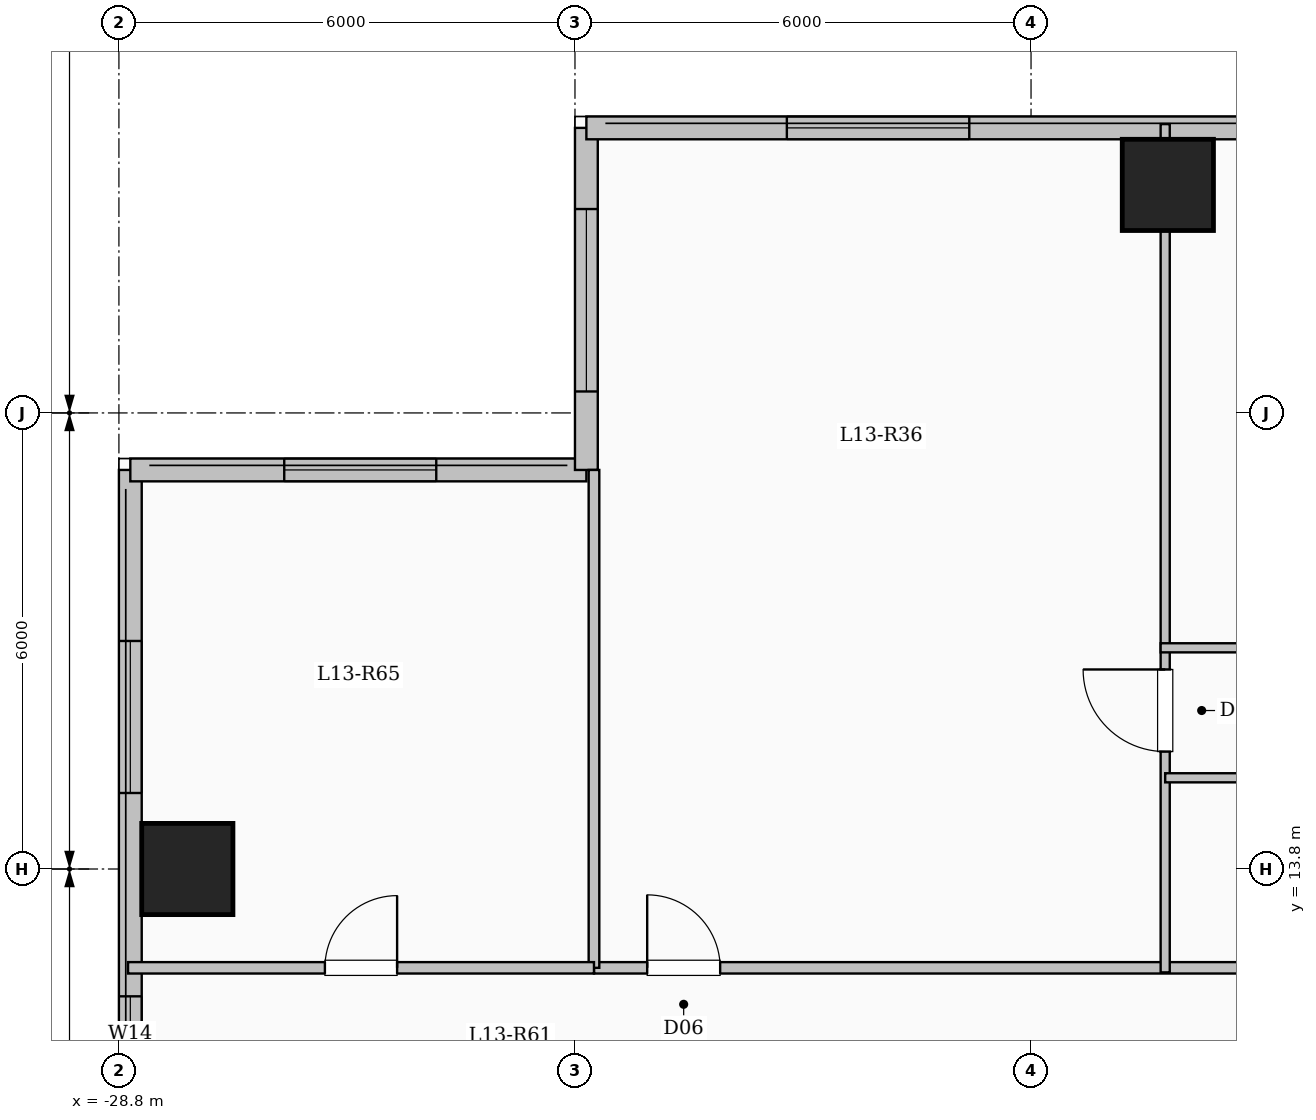
"""IFC4 building model, lengths in metres.
Left out: names, types, materials, properties, quantities, classifications, styles, units other than length and angle.
Written with IfcOpenShell. Run it as: python <this file> out.ifc"""

import sys

from ifc_helpers import new_model, si_unit, direction, frame, frame_2d, origin, origin_2d, place, context, subcontext, project, spatial, rectangle, extrude, element, fill, save


model = new_model("IFC4")
c1 = context("Model", 3, precision=1e-05, world=origin(), true_north=direction((0.0, 1.0)))
c2 = subcontext(c1, "Body", "Model", "MODEL_VIEW")
j1 = project(units=[si_unit("LENGTHUNIT", "METRE"), si_unit("PLANEANGLEUNIT", "RADIAN")], contexts=[c1])
p1 = place(None, origin())
s1 = spatial("IfcSite", under=j1, at=p1, CompositionType="ELEMENT")
p2 = place(p1, origin())
s2 = spatial("IfcBuilding", under=s1, at=p2, CompositionType="ELEMENT")
p3 = place(p2, frame((0.0, 0.0, 50.8)))
s3 = spatial("IfcBuildingStorey", under=s2, at=p3, CompositionType="ELEMENT", Elevation=50.8)
for number, where, z_axis, x_axis in (
    (1, (-15.0, 22.8, 0.0), (0.0, 0.0, 1.0), (1.0, 0.0, 0.0)),
    (2, (-27.9, 13.8, 0.0), (0.0, 0.0, 1.0), (1.0, 0.0, 0.0)),
):
    element("IfcColumn", number, at=place(p3, frame(where, z_axis=z_axis, x_axis=x_axis)), inside=s3, PredefinedType="COLUMN", context=c2, shape_type="SweptSolid", body=[
        extrude(rectangle(XDim=1.2, YDim=1.2, at=origin_2d()), origin(), (0.0, 0.0, 1.0), 3.35),
    ])
p4 = place(p3, frame((-28.65, -19.05, 0.0), z_axis=(0.0, 0.0, 1.0), x_axis=(0.0, 1.0, 0.0)))
e3 = element("IfcWall", 3, at=p4, inside=s3, PredefinedType="SOLIDWALL", context=c2, shape_type="SweptSolid", body=[
    extrude(rectangle(XDim=38.1, YDim=0.3, at=frame_2d((19.05, 0.0))), origin(), (0.0, 0.0, 1.0), 3.1),
])
p5 = place(p4, frame((3.15, 0.0, 0.9)))
e4 = element("IfcOpeningElement", 4, at=p5, cuts=e3, PredefinedType="OPENING", context=c2, shape_type="SweptSolid", body=[
    extrude(rectangle(XDim=2.4, YDim=1.8, at=frame_2d((1.2, 0.9))), frame((0.0, 0.16, 0.0), z_axis=(0.0, -1.0, 0.0), x_axis=(1.0, 0.0, 0.0)), (0.0, 0.0, 1.0), 0.32),
])
p6 = place(p4, frame((9.542, 0.0, 0.9)))
e5 = element("IfcOpeningElement", 5, at=p6, cuts=e3, PredefinedType="OPENING", context=c2, shape_type="SweptSolid", body=[
    extrude(rectangle(XDim=1.5, YDim=1.65, at=frame_2d((0.75, 0.825))), frame((0.0, 0.16, 0.0), z_axis=(0.0, -1.0, 0.0), x_axis=(1.0, 0.0, 0.0)), (0.0, 0.0, 1.0), 0.32),
])
p7 = place(p4, frame((19.8, 0.0, 0.9)))
e6 = element("IfcOpeningElement", 6, at=p7, cuts=e3, PredefinedType="OPENING", context=c2, shape_type="SweptSolid", body=[
    extrude(rectangle(XDim=2.0, YDim=1.7, at=frame_2d((1.0, 0.85))), frame((0.0, 0.16, 0.0), z_axis=(0.0, -1.0, 0.0), x_axis=(1.0, 0.0, 0.0)), (0.0, 0.0, 1.0), 0.32),
])
p8 = place(p4, frame((30.175, 0.0, 0.95)))
e7 = element("IfcOpeningElement", 7, at=p8, cuts=e3, PredefinedType="OPENING", context=c2, shape_type="SweptSolid", body=[
    extrude(rectangle(XDim=1.0, YDim=1.5, at=frame_2d((0.5, 0.75))), frame((0.0, 0.16, 0.0), z_axis=(0.0, -1.0, 0.0), x_axis=(1.0, 0.0, 0.0)), (0.0, 0.0, 1.0), 0.32),
])
p9 = place(p4, frame((33.85, 0.0, 0.9)))
e8 = element("IfcOpeningElement", 8, at=p9, cuts=e3, PredefinedType="OPENING", context=c2, shape_type="SweptSolid", body=[
    extrude(rectangle(XDim=2.0, YDim=1.7, at=frame_2d((1.0, 0.85))), frame((0.0, 0.16, 0.0), z_axis=(0.0, -1.0, 0.0), x_axis=(1.0, 0.0, 0.0)), (0.0, 0.0, 1.0), 0.32),
])
p10 = place(p3, frame((-28.65, 19.05, 0.0), z_axis=(0.0, 0.0, 1.0), x_axis=(1.0, 0.0, 0.0)))
e9 = element("IfcWall", 9, at=p10, inside=s3, PredefinedType="SOLIDWALL", context=c2, shape_type="SweptSolid", body=[
    extrude(rectangle(XDim=6.0, YDim=0.3, at=frame_2d((3.0, 0.0))), origin(), (0.0, 0.0, 1.0), 3.1),
])
p11 = place(p10, frame((2.025, 0.0, 0.9)))
e10 = element("IfcOpeningElement", 10, at=p11, cuts=e9, PredefinedType="OPENING", context=c2, shape_type="SweptSolid", body=[
    extrude(rectangle(XDim=2.0, YDim=1.7, at=frame_2d((1.0, 0.85))), frame((0.0, 0.16, 0.0), z_axis=(0.0, -1.0, 0.0), x_axis=(1.0, 0.0, 0.0)), (0.0, 0.0, 1.0), 0.32),
])
p12 = place(p3, frame((-22.65, 19.05, 0.0), z_axis=(0.0, 0.0, 1.0), x_axis=(0.0, 1.0, 0.0)))
e11 = element("IfcWall", 11, at=p12, inside=s3, PredefinedType="SOLIDWALL", context=c2, shape_type="SweptSolid", body=[
    extrude(rectangle(XDim=4.5, YDim=0.3, at=frame_2d((2.25, 0.0))), origin(), (0.0, 0.0, 1.0), 3.1),
])
p13 = place(p12, frame((1.032, 0.0, 0.9)))
e12 = element("IfcOpeningElement", 12, at=p13, cuts=e11, PredefinedType="OPENING", context=c2, shape_type="SweptSolid", body=[
    extrude(rectangle(XDim=2.4, YDim=1.8, at=frame_2d((1.2, 0.9))), frame((0.0, 0.16, 0.0), z_axis=(0.0, -1.0, 0.0), x_axis=(1.0, 0.0, 0.0)), (0.0, 0.0, 1.0), 0.32),
])
p14 = place(p3, frame((-22.65, 23.55, 0.0), z_axis=(0.0, 0.0, 1.0), x_axis=(1.0, 0.0, 0.0)))
e13 = element("IfcWall", 13, at=p14, inside=s3, PredefinedType="SOLIDWALL", context=c2, shape_type="SweptSolid", body=[
    extrude(rectangle(XDim=15.3, YDim=0.3, at=frame_2d((7.65, 0.0))), origin(), (0.0, 0.0, 1.0), 3.1),
])
p15 = place(p14, frame((2.637, 0.0, 0.9)))
e14 = element("IfcOpeningElement", 14, at=p15, cuts=e13, PredefinedType="OPENING", context=c2, shape_type="SweptSolid", body=[
    extrude(rectangle(XDim=2.4, YDim=1.8, at=frame_2d((1.2, 0.9))), frame((0.0, 0.16, 0.0), z_axis=(0.0, -1.0, 0.0), x_axis=(1.0, 0.0, 0.0)), (0.0, 0.0, 1.0), 0.32),
])
p16 = place(p14, frame((8.656, 0.0, 0.9)))
e15 = element("IfcOpeningElement", 15, at=p16, cuts=e13, PredefinedType="OPENING", context=c2, shape_type="SweptSolid", body=[
    extrude(rectangle(XDim=1.8, YDim=1.65, at=frame_2d((0.9, 0.825))), frame((0.0, 0.16, 0.0), z_axis=(0.0, -1.0, 0.0), x_axis=(1.0, 0.0, 0.0)), (0.0, 0.0, 1.0), 0.32),
])
p17 = place(p14, frame((12.544, 0.0, 0.9)))
e16 = element("IfcOpeningElement", 16, at=p17, cuts=e13, PredefinedType="OPENING", context=c2, shape_type="SweptSolid", body=[
    extrude(rectangle(XDim=1.8, YDim=1.65, at=frame_2d((0.9, 0.825))), frame((0.0, 0.16, 0.0), z_axis=(0.0, -1.0, 0.0), x_axis=(1.0, 0.0, 0.0)), (0.0, 0.0, 1.0), 0.32),
])
p18 = place(p3, frame((-22.55, 12.5, 0.0), z_axis=(0.0, 0.0, 1.0), x_axis=(1.0, 0.0, 0.0)))
e17 = element("IfcWall", 17, at=p18, inside=s3, PredefinedType="PARTITIONING", context=c2, shape_type="SweptSolid", body=[
    extrude(rectangle(XDim=18.7, YDim=0.15, at=frame_2d((9.35, 0.0))), origin(), (0.0, 0.0, 1.0), 3.1),
])
p19 = place(p18, frame((0.7, 0.0, 0.0)))
e18 = element("IfcOpeningElement", 18, at=p19, cuts=e17, PredefinedType="OPENING", context=c2, shape_type="SweptSolid", body=[
    extrude(rectangle(XDim=0.96, YDim=2.15, at=frame_2d((0.48, 1.075))), frame((0.0, 0.085, 0.0), z_axis=(0.0, -1.0, 0.0), x_axis=(1.0, 0.0, 0.0)), (0.0, 0.0, 1.0), 0.17),
])
p20 = place(p3, frame((-15.035, 12.44, 0.0), z_axis=(0.0, 0.0, 1.0), x_axis=(0.0, 1.0, 0.0)))
e19 = element("IfcWall", 19, at=p20, inside=s3, PredefinedType="PARTITIONING", context=c2, shape_type="SweptSolid", body=[
    extrude(rectangle(XDim=11.16, YDim=0.12, at=frame_2d((5.58, 0.0))), origin(), (0.0, 0.0, 1.0), 2.435),
])
p21 = place(p20, frame((2.905, 0.0, 0.0)))
e20 = element("IfcOpeningElement", 20, at=p21, cuts=e19, PredefinedType="OPENING", context=c2, shape_type="SweptSolid", body=[
    extrude(rectangle(XDim=1.08, YDim=2.15, at=frame_2d((0.54, 1.075))), frame((0.0, 0.07, 0.0), z_axis=(0.0, -1.0, 0.0), x_axis=(1.0, 0.0, 0.0)), (0.0, 0.0, 1.0), 0.14),
])
p22 = place(p3, frame((-15.035, 15.0, 0.0), z_axis=(0.0, 0.0, 1.0), x_axis=(1.0, 0.0, 0.0)))
e21 = element("IfcWall", 21, at=p22, inside=s3, PredefinedType="PARTITIONING", context=c2, shape_type="SweptSolid", body=[
    extrude(rectangle(XDim=8.228, YDim=0.12, at=frame_2d((4.114, 0.0))), origin(), (0.0, 0.0, 1.0), 2.585),
])
p23 = place(p22, frame((3.674, 0.0, 0.0)))
e22 = element("IfcOpeningElement", 22, at=p23, cuts=e21, PredefinedType="OPENING", context=c2, shape_type="SweptSolid", body=[
    extrude(rectangle(XDim=0.88, YDim=2.1, at=frame_2d((0.44, 1.05))), frame((0.0, 0.07, 0.0), z_axis=(0.0, -1.0, 0.0), x_axis=(1.0, 0.0, 0.0)), (0.0, 0.0, 1.0), 0.14),
])
p24 = place(p3, frame((-15.095, 16.71, 0.0), z_axis=(0.0, 0.0, 1.0), x_axis=(1.0, 0.0, 0.0)))
e23 = element("IfcWall", 23, at=p24, inside=s3, PredefinedType="PARTITIONING", context=c2, shape_type="SweptSolid", body=[
    extrude(rectangle(XDim=15.705, YDim=0.12, at=frame_2d((7.853, 0.0))), origin(), (0.0, 0.0, 1.0), 2.585),
])
p25 = place(p24, frame((1.501, 0.0, 0.0)))
e24 = element("IfcOpeningElement", 24, at=p25, cuts=e23, PredefinedType="OPENING", context=c2, shape_type="SweptSolid", body=[
    extrude(rectangle(XDim=0.88, YDim=2.1, at=frame_2d((0.44, 1.05))), frame((0.0, 0.07, 0.0), z_axis=(0.0, -1.0, 0.0), x_axis=(1.0, 0.0, 0.0)), (0.0, 0.0, 1.0), 0.14),
])
p26 = place(p24, frame((5.382, 0.0, 0.0)))
e25 = element("IfcOpeningElement", 25, at=p26, cuts=e23, PredefinedType="OPENING", context=c2, shape_type="SweptSolid", body=[
    extrude(rectangle(XDim=0.88, YDim=2.1, at=frame_2d((0.44, 1.05))), frame((0.0, 0.07, 0.0), z_axis=(0.0, -1.0, 0.0), x_axis=(1.0, 0.0, 0.0)), (0.0, 0.0, 1.0), 0.14),
])
p27 = place(p24, frame((9.263, 0.0, 0.0)))
e26 = element("IfcOpeningElement", 26, at=p27, cuts=e23, PredefinedType="OPENING", context=c2, shape_type="SweptSolid", body=[
    extrude(rectangle(XDim=0.88, YDim=2.1, at=frame_2d((0.44, 1.05))), frame((0.0, 0.07, 0.0), z_axis=(0.0, -1.0, 0.0), x_axis=(1.0, 0.0, 0.0)), (0.0, 0.0, 1.0), 0.14),
])
p28 = place(p24, frame((13.144, 0.0, 0.0)))
e27 = element("IfcOpeningElement", 27, at=p28, cuts=e23, PredefinedType="OPENING", context=c2, shape_type="SweptSolid", body=[
    extrude(rectangle(XDim=0.88, YDim=2.1, at=frame_2d((0.44, 1.05))), frame((0.0, 0.07, 0.0), z_axis=(0.0, -1.0, 0.0), x_axis=(1.0, 0.0, 0.0)), (0.0, 0.0, 1.0), 0.14),
])
p29 = place(p3, frame((-22.55, 12.5, 0.0), z_axis=(0.0, 0.0, 1.0), x_axis=(0.0, 1.0, 0.0)))
e28 = element("IfcWall", 28, at=p29, inside=s3, PredefinedType="PARTITIONING", context=c2, shape_type="SweptSolid", body=[
    extrude(rectangle(XDim=6.55, YDim=0.14, at=frame_2d((3.275, 0.0))), origin(), (0.0, 0.0, 1.0), 3.1),
])
p30 = place(p3, frame((-28.68, 12.5, 0.0), z_axis=(0.0, 0.0, 1.0), x_axis=(1.0, 0.0, 0.0)))
e29 = element("IfcWall", 29, at=p30, inside=s3, PredefinedType="PARTITIONING", context=c2, shape_type="SweptSolid", body=[
    extrude(rectangle(XDim=6.13, YDim=0.15, at=frame_2d((3.065, 0.0))), origin(), (0.0, 0.0, 1.0), 3.1),
])
p31 = place(p30, frame((2.59, 0.0, 0.0)))
e30 = element("IfcOpeningElement", 30, at=p31, cuts=e29, PredefinedType="OPENING", context=c2, shape_type="SweptSolid", body=[
    extrude(rectangle(XDim=0.95, YDim=2.15, at=frame_2d((0.475, 1.075))), frame((0.0, 0.085, 0.0), z_axis=(0.0, -1.0, 0.0), x_axis=(1.0, 0.0, 0.0)), (0.0, 0.0, 1.0), 0.17),
])
p32 = place(p8, origin())
e31 = element("IfcWindow", 31, at=p32, inside=s3, PartitioningType="SINGLE_PANEL", PredefinedType="WINDOW", context=c2, shape_type="SweptSolid", body=[
    extrude(rectangle(XDim=1.0, YDim=1.5, at=frame_2d((0.5, 0.75))), frame((0.0, 0.03, 0.0), z_axis=(0.0, -1.0, 0.0), x_axis=(1.0, 0.0, 0.0)), (0.0, 0.0, 1.0), 0.06),
])
fill(e7, e31)
p33 = place(p9, origin())
e32 = element("IfcWindow", 32, at=p33, inside=s3, PartitioningType="SINGLE_PANEL", PredefinedType="WINDOW", context=c2, shape_type="SweptSolid", body=[
    extrude(rectangle(XDim=2.0, YDim=1.7, at=frame_2d((1.0, 0.85))), frame((0.0, 0.03, 0.0), z_axis=(0.0, -1.0, 0.0), x_axis=(1.0, 0.0, 0.0)), (0.0, 0.0, 1.0), 0.06),
])
fill(e8, e32)
p34 = place(p11, origin())
e33 = element("IfcWindow", 33, at=p34, inside=s3, PartitioningType="SINGLE_PANEL", PredefinedType="WINDOW", context=c2, shape_type="SweptSolid", body=[
    extrude(rectangle(XDim=2.0, YDim=1.7, at=frame_2d((1.0, 0.85))), frame((0.0, 0.03, 0.0), z_axis=(0.0, -1.0, 0.0), x_axis=(1.0, 0.0, 0.0)), (0.0, 0.0, 1.0), 0.06),
])
fill(e10, e33)
p35 = place(p13, origin())
e34 = element("IfcWindow", 34, at=p35, inside=s3, PartitioningType="SINGLE_PANEL", PredefinedType="WINDOW", context=c2, shape_type="SweptSolid", body=[
    extrude(rectangle(XDim=2.4, YDim=1.8, at=frame_2d((1.2, 0.9))), frame((0.0, 0.03, 0.0), z_axis=(0.0, -1.0, 0.0), x_axis=(1.0, 0.0, 0.0)), (0.0, 0.0, 1.0), 0.06),
])
fill(e12, e34)
p36 = place(p15, origin())
e35 = element("IfcWindow", 35, at=p36, inside=s3, PartitioningType="SINGLE_PANEL", PredefinedType="WINDOW", context=c2, shape_type="SweptSolid", body=[
    extrude(rectangle(XDim=2.4, YDim=1.8, at=frame_2d((1.2, 0.9))), frame((0.0, 0.03, 0.0), z_axis=(0.0, -1.0, 0.0), x_axis=(1.0, 0.0, 0.0)), (0.0, 0.0, 1.0), 0.06),
])
fill(e14, e35)
p37 = place(p19, origin())
e36 = element("IfcDoor", 36, at=p37, inside=s3, OperationType="SINGLE_SWING_LEFT", PredefinedType="DOOR", context=c2, shape_type="SweptSolid", body=[
    extrude(rectangle(XDim=0.96, YDim=2.15, at=frame_2d((0.48, 1.075))), frame((0.0, 0.025, 0.0), z_axis=(0.0, -1.0, 0.0), x_axis=(1.0, 0.0, 0.0)), (0.0, 0.0, 1.0), 0.05),
])
fill(e18, e36)
p38 = place(p21, origin())
e37 = element("IfcDoor", 37, at=p38, inside=s3, OperationType="SINGLE_SWING_RIGHT", PredefinedType="DOOR", context=c2, shape_type="SweptSolid", body=[
    extrude(rectangle(XDim=1.08, YDim=2.15, at=frame_2d((0.54, 1.075))), frame((0.0, 0.025, 0.0), z_axis=(0.0, -1.0, 0.0), x_axis=(1.0, 0.0, 0.0)), (0.0, 0.0, 1.0), 0.05),
])
fill(e20, e37)
p39 = place(p31, origin())
e38 = element("IfcDoor", 38, at=p39, inside=s3, OperationType="SINGLE_SWING_RIGHT", PredefinedType="DOOR", context=c2, shape_type="SweptSolid", body=[
    extrude(rectangle(XDim=0.95, YDim=2.15, at=frame_2d((0.475, 1.075))), frame((0.0, 0.025, 0.0), z_axis=(0.0, -1.0, 0.0), x_axis=(1.0, 0.0, 0.0)), (0.0, 0.0, 1.0), 0.05),
])
fill(e30, e38)
save(model, sys.argv[1])
